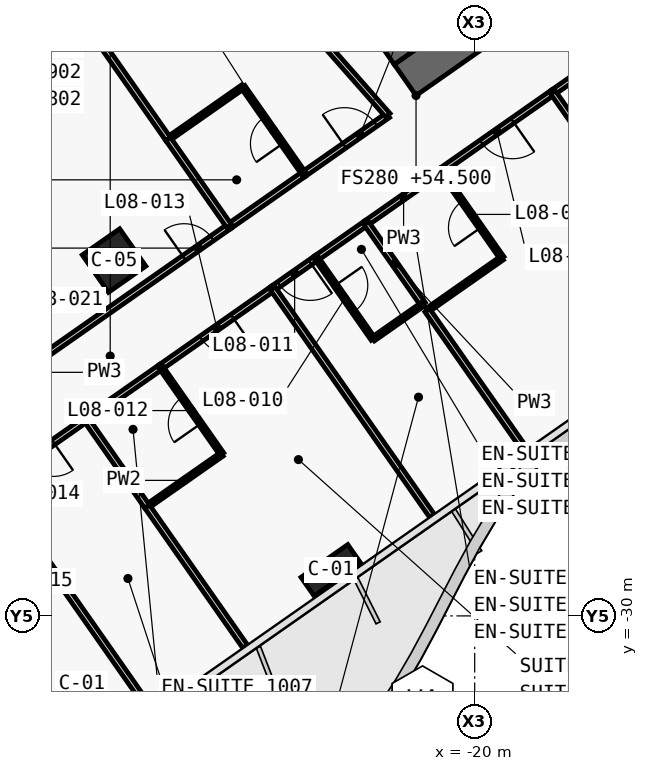
"""IFC4 building model, lengths in metres.
Left out: names, types, materials, properties, quantities, classifications, styles, units other than length and angle.
Written with IfcOpenShell. Run it as: python <this file> out.ifc"""

import sys

from ifc_helpers import new_model, si_unit, direction, frame, frame_2d, origin, origin_2d, place, context, subcontext, project, spatial, polyline, rectangle, outline, extrude, element, fill, save


model = new_model("IFC4")
c1 = context("Model", 3, precision=1e-05, world=origin(), true_north=direction((0.0, 1.0)))
c2 = subcontext(c1, "Body", "Model", "MODEL_VIEW")
j1 = project(units=[si_unit("LENGTHUNIT", "METRE"), si_unit("PLANEANGLEUNIT", "RADIAN")], contexts=[c1])
p1 = place(None, origin())
s1 = spatial("IfcSite", under=j1, at=p1, CompositionType="ELEMENT")
p2 = place(p1, origin())
s2 = spatial("IfcBuilding", under=s1, at=p2, CompositionType="ELEMENT")
p3 = place(p2, frame((0.0, 0.0, 54.5)))
s3 = spatial("IfcBuildingStorey", under=s2, at=p3, CompositionType="ELEMENT", Elevation=54.5)
p4 = place(p3, frame((0.037, -0.585, 0.0), z_axis=(0.0, 0.0, 1.0), x_axis=(-0.819157152511, -0.573569140985, 0.0)))
e1 = element("IfcWall", 1, at=p4, inside=s3, PredefinedType="SHEAR", context=c2, shape_type="SweptSolid", body=[
    extrude(outline(polyline([(26.695, 0.5), (0.7, 0.5), (0.0, -0.5), (26.695, -0.5), (26.695, 0.5)])), origin(), (0.0, 0.0, 1.0), 3.6),
])
p5 = place(p4, frame((2.995, 0.0, 0.0)))
e2 = element("IfcOpeningElement", 2, at=p5, cuts=e1, PredefinedType="OPENING", context=c2, shape_type="SweptSolid", body=[
    extrude(rectangle(XDim=2.4, YDim=2.1, at=frame_2d((1.2, 1.05))), frame((0.0, 0.51, 0.0), z_axis=(0.0, -1.0, 0.0), x_axis=(1.0, 0.0, 0.0)), (0.0, 0.0, 1.0), 1.02),
])
p6 = place(p4, frame((11.995, 0.0, 0.0)))
e3 = element("IfcOpeningElement", 3, at=p6, cuts=e1, PredefinedType="OPENING", context=c2, shape_type="SweptSolid", body=[
    extrude(rectangle(XDim=2.4, YDim=2.1, at=frame_2d((1.2, 1.05))), frame((0.0, 0.51, 0.0), z_axis=(0.0, -1.0, 0.0), x_axis=(1.0, 0.0, 0.0)), (0.0, 0.0, 1.0), 1.02),
])
p7 = place(p3, frame((-21.708, -15.2, 0.0), z_axis=(0.0, 0.0, 1.0), x_axis=(-0.573576324356, 0.819152122709, 0.0)))
e4 = element("IfcWall", 4, at=p7, inside=s3, PredefinedType="SHEAR", context=c2, shape_type="SweptSolid", body=[
    extrude(outline(polyline([(0.0, 0.5), (0.0, -0.5), (9.2, -0.5), (9.2, 0.5), (0.0, 0.5)])), origin(), (0.0, 0.0, 1.0), 3.6),
])
p8 = place(p7, frame((6.1, 0.0, 0.0)))
e5 = element("IfcOpeningElement", 5, at=p8, cuts=e4, PredefinedType="OPENING", context=c2, shape_type="SweptSolid", body=[
    extrude(rectangle(XDim=1.8, YDim=2.1, at=frame_2d((0.9, 1.05))), frame((0.0, 0.51, 0.0), z_axis=(0.0, -1.0, 0.0), x_axis=(1.0, 0.0, 0.0)), (0.0, 0.0, 1.0), 1.02),
])
p9 = place(p7, frame((1.9, 0.0, 0.0)))
e6 = element("IfcOpeningElement", 6, at=p9, cuts=e4, PredefinedType="OPENING", context=c2, shape_type="SweptSolid", body=[
    extrude(rectangle(XDim=1.8, YDim=2.1, at=frame_2d((0.9, 1.05))), frame((0.0, 0.51, 0.0), z_axis=(0.0, -1.0, 0.0), x_axis=(1.0, 0.0, 0.0)), (0.0, 0.0, 1.0), 1.02),
])
p10 = place(p3, frame((-23.782, -28.799, 0.0), z_axis=(0.0, 0.0, 1.0), x_axis=(-0.819152044289, -0.573576436351, 0.0)))
e7 = element("IfcColumn", 7, at=p10, inside=s3, PredefinedType="COLUMN", context=c2, shape_type="SweptSolid", body=[
    extrude(rectangle(XDim=1.5, YDim=0.6, at=origin_2d()), origin(), (0.0, 0.0, 1.0), 3.6),
])
p11 = place(p3, frame((-29.49, -20.649, 0.0), z_axis=(0.0, 0.0, 1.0), x_axis=(-0.819152044289, -0.573576436351, 0.0)))
e8 = element("IfcColumn", 8, at=p11, inside=s3, PredefinedType="COLUMN", context=c2, shape_type="SweptSolid", body=[
    extrude(rectangle(XDim=1.2, YDim=1.2, at=origin_2d()), origin(), (0.0, 0.0, 1.0), 3.6),
])
p12 = place(p3, frame((-24.493, -18.371, 0.0), z_axis=(0.0, 0.0, 1.0), x_axis=(0.819176640776, 0.573541307325, 0.0)))
e9 = element("IfcWall", 9, at=p12, inside=s3, PredefinedType="PARTITIONING", context=c2, shape_type="SweptSolid", body=[
    extrude(rectangle(XDim=2.698, YDim=0.15, at=frame_2d((1.349, 0.0))), origin(), (0.0, 0.0, 1.0), 3.32),
])
p13 = place(p12, frame((1.301, 0.0, 0.0)))
e10 = element("IfcOpeningElement", 10, at=p13, cuts=e9, PredefinedType="OPENING", context=c2, shape_type="SweptSolid", body=[
    extrude(rectangle(XDim=1.0, YDim=2.1, at=frame_2d((0.5, 1.05))), frame((0.0, 0.085, 0.0), z_axis=(0.0, -1.0, 0.0), x_axis=(1.0, 0.0, 0.0)), (0.0, 0.0, 1.0), 0.17),
])
p14 = place(p3, frame((-26.46, -19.748, 0.0), z_axis=(0.0, 0.0, 1.0), x_axis=(0.819179439794, 0.573537309527, 0.0)))
e11 = element("IfcWall", 11, at=p14, inside=s3, PredefinedType="PARTITIONING", context=c2, shape_type="SweptSolid", body=[
    extrude(rectangle(XDim=2.404, YDim=0.15, at=frame_2d((1.202, 0.0))), origin(), (0.0, 0.0, 1.0), 3.32),
])
p15 = place(p3, frame((-31.375, -23.19, 0.0), z_axis=(0.0, 0.0, 1.0), x_axis=(0.819165052243, 0.573557858619, 0.0)))
e12 = element("IfcWall", 12, at=p15, inside=s3, PredefinedType="PARTITIONING", context=c2, shape_type="SweptSolid", body=[
    extrude(rectangle(XDim=6.004, YDim=0.15, at=frame_2d((3.002, 0.0))), origin(), (0.0, 0.0, 1.0), 2.6),
])
p16 = place(p15, frame((4.552, 0.0, 0.0)))
e13 = element("IfcOpeningElement", 13, at=p16, cuts=e12, PredefinedType="OPENING", context=c2, shape_type="SweptSolid", body=[
    extrude(rectangle(XDim=0.9, YDim=2.1, at=frame_2d((0.45, 1.05))), frame((0.0, 0.085, 0.0), z_axis=(0.0, -1.0, 0.0), x_axis=(1.0, 0.0, 0.0)), (0.0, 0.0, 1.0), 0.17),
])
p17 = place(p3, frame((-15.48, -14.501, 0.0), z_axis=(0.0, 0.0, 1.0), x_axis=(-0.819193738533, -0.573516886193, 0.0)))
e14 = element("IfcWall", 14, at=p17, inside=s3, PredefinedType="PARTITIONING", context=c2, shape_type="SweptSolid", body=[
    extrude(rectangle(XDim=3.004, YDim=0.15, at=frame_2d((1.502, 0.0))), origin(), (0.0, 0.0, 1.0), 3.32),
])
p18 = place(p17, frame((1.052, 0.0, 0.0)))
e15 = element("IfcOpeningElement", 15, at=p18, cuts=e14, PredefinedType="OPENING", context=c2, shape_type="SweptSolid", body=[
    extrude(rectangle(XDim=0.9, YDim=2.1, at=frame_2d((0.45, 1.05))), frame((0.0, 0.085, 0.0), z_axis=(0.0, -1.0, 0.0), x_axis=(1.0, 0.0, 0.0)), (0.0, 0.0, 1.0), 0.17),
])
p19 = place(p3, frame((-17.937, -16.222, 0.0), z_axis=(0.0, 0.0, 1.0), x_axis=(-0.819145961204, -0.573585123798, 0.0)))
e16 = element("IfcWall", 16, at=p19, inside=s3, PredefinedType="PARTITIONING", context=c2, shape_type="SweptSolid", body=[
    extrude(rectangle(XDim=3.603, YDim=0.15, at=frame_2d((1.802, 0.0))), origin(), (0.0, 0.0, 1.0), 2.6),
])
p20 = place(p19, frame((1.302, 0.0, 0.0)))
e17 = element("IfcOpeningElement", 17, at=p20, cuts=e16, PredefinedType="OPENING", context=c2, shape_type="SweptSolid", body=[
    extrude(rectangle(XDim=1.0, YDim=2.1, at=frame_2d((0.5, 1.05))), frame((0.0, 0.085, 0.0), z_axis=(0.0, -1.0, 0.0), x_axis=(1.0, 0.0, 0.0)), (0.0, 0.0, 1.0), 0.17),
])
p21 = place(p3, frame((-20.886, -18.287, 0.0), z_axis=(0.0, 0.0, 1.0), x_axis=(-0.819146032251, -0.573585022335, 0.0)))
e18 = element("IfcWall", 18, at=p21, inside=s3, PredefinedType="PARTITIONING", context=c2, shape_type="SweptSolid", body=[
    extrude(rectangle(XDim=2.404, YDim=0.15, at=frame_2d((1.202, 0.0))), origin(), (0.0, 0.0, 1.0), 3.32),
])
p22 = place(p3, frame((-24.164, -20.582, 0.0), z_axis=(0.0, 0.0, 1.0), x_axis=(-0.819060210533, -0.573707566205, 0.0)))
e19 = element("IfcWall", 19, at=p22, inside=s3, PredefinedType="PARTITIONING", context=c2, shape_type="SweptSolid", body=[
    extrude(rectangle(XDim=1.403, YDim=0.15, at=frame_2d((0.702, 0.0))), origin(), (0.0, 0.0, 1.0), 3.32),
])
p23 = place(p22, frame((0.201, 0.0, 0.0)))
e20 = element("IfcOpeningElement", 20, at=p23, cuts=e19, PredefinedType="OPENING", context=c2, shape_type="SweptSolid", body=[
    extrude(rectangle(XDim=1.0, YDim=2.1, at=frame_2d((0.5, 1.05))), frame((0.0, 0.085, 0.0), z_axis=(0.0, -1.0, 0.0), x_axis=(1.0, 0.0, 0.0)), (0.0, 0.0, 1.0), 0.17),
])
p24 = place(p3, frame((-22.852, -19.664, 0.0), z_axis=(0.0, 0.0, 1.0), x_axis=(-0.819138938282, -0.573595153214, 0.0)))
e21 = element("IfcWall", 21, at=p24, inside=s3, PredefinedType="PARTITIONING", context=c2, shape_type="SweptSolid", body=[
    extrude(rectangle(XDim=1.604, YDim=0.15, at=frame_2d((0.802, 0.0))), origin(), (0.0, 0.0, 1.0), 3.32),
])
p25 = place(p3, frame((-25.31, -21.384, 0.0), z_axis=(0.0, 0.0, 1.0), x_axis=(-0.819145961204, -0.573585123798, 0.0)))
e22 = element("IfcWall", 22, at=p25, inside=s3, PredefinedType="PARTITIONING", context=c2, shape_type="SweptSolid", body=[
    extrude(rectangle(XDim=3.603, YDim=0.15, at=frame_2d((1.802, 0.0))), origin(), (0.0, 0.0, 1.0), 2.6),
])
p26 = place(p25, frame((1.302, 0.0, 0.0)))
e23 = element("IfcOpeningElement", 23, at=p26, cuts=e22, PredefinedType="OPENING", context=c2, shape_type="SweptSolid", body=[
    extrude(rectangle(XDim=1.0, YDim=2.1, at=frame_2d((0.5, 1.05))), frame((0.0, 0.085, 0.0), z_axis=(0.0, -1.0, 0.0), x_axis=(1.0, 0.0, 0.0)), (0.0, 0.0, 1.0), 0.17),
])
p27 = place(p3, frame((-28.259, -23.449, 0.0), z_axis=(0.0, 0.0, 1.0), x_axis=(-0.819146032251, -0.573585022335, 0.0)))
e24 = element("IfcWall", 24, at=p27, inside=s3, PredefinedType="PARTITIONING", context=c2, shape_type="SweptSolid", body=[
    extrude(rectangle(XDim=2.404, YDim=0.15, at=frame_2d((1.202, 0.0))), origin(), (0.0, 0.0, 1.0), 3.32),
])
p28 = place(p3, frame((-30.225, -24.826, 0.0), z_axis=(0.0, 0.0, 1.0), x_axis=(-0.819128818764, -0.573609604409, 0.0)))
e25 = element("IfcWall", 25, at=p28, inside=s3, PredefinedType="PARTITIONING", context=c2, shape_type="SweptSolid", body=[
    extrude(rectangle(XDim=3.004, YDim=0.15, at=frame_2d((1.502, 0.0))), origin(), (0.0, 0.0, 1.0), 3.32),
])
p29 = place(p28, frame((1.052, 0.0, 0.0)))
e26 = element("IfcOpeningElement", 26, at=p29, cuts=e25, PredefinedType="OPENING", context=c2, shape_type="SweptSolid", body=[
    extrude(rectangle(XDim=0.9, YDim=2.1, at=frame_2d((0.45, 1.05))), frame((0.0, 0.085, 0.0), z_axis=(0.0, -1.0, 0.0), x_axis=(1.0, 0.0, 0.0)), (0.0, 0.0, 1.0), 0.17),
])
p30 = place(p3, frame((-22.284, -16.827, 0.0), z_axis=(0.0, 0.0, 1.0), x_axis=(-0.661545117561, 0.749905365651, 0.0)))
e27 = element("IfcWall", 27, at=p30, inside=s3, PredefinedType="PARTITIONING", context=c2, shape_type="SweptSolid", body=[
    extrude(rectangle(XDim=6.543, YDim=0.15, at=frame_2d((3.271, 0.0))), origin(), (0.0, 0.0, 1.0), 2.6),
])
p31 = place(p3, frame((-24.492, -18.37, 0.0), z_axis=(0.0, 0.0, 1.0), x_axis=(-0.573550118428, 0.819170471667, 0.0)))
e28 = element("IfcWall", 28, at=p31, inside=s3, PredefinedType="PARTITIONING", context=c2, shape_type="SweptSolid", body=[
    extrude(rectangle(XDim=2.8, YDim=0.12, at=frame_2d((1.4, 0.0))), origin(), (0.0, 0.0, 1.0), 2.6),
])
p32 = place(p31, frame((0.975, 0.0, 0.0)))
e29 = element("IfcOpeningElement", 29, at=p32, cuts=e28, PredefinedType="OPENING", context=c2, shape_type="SweptSolid", body=[
    extrude(rectangle(XDim=0.85, YDim=2.05, at=frame_2d((0.425, 1.025))), frame((0.0, 0.07, 0.0), z_axis=(0.0, -1.0, 0.0), x_axis=(1.0, 0.0, 0.0)), (0.0, 0.0, 1.0), 0.14),
])
p33 = place(p3, frame((-26.099, -16.076, 0.0), z_axis=(0.0, 0.0, 1.0), x_axis=(-0.819155442668, -0.573571582932, 0.0)))
e30 = element("IfcWall", 30, at=p33, inside=s3, PredefinedType="PARTITIONING", context=c2, shape_type="SweptSolid", body=[
    extrude(rectangle(XDim=2.4, YDim=0.12, at=frame_2d((1.2, 0.0))), origin(), (0.0, 0.0, 1.0), 3.32),
])
p34 = place(p3, frame((-28.065, -17.453, 0.0), z_axis=(0.0, 0.0, 1.0), x_axis=(-0.573593433868, 0.819140142237, 0.0)))
e31 = element("IfcWall", 31, at=p34, inside=s3, PredefinedType="PARTITIONING", context=c2, shape_type="SweptSolid", body=[
    extrude(rectangle(XDim=8.499, YDim=0.15, at=frame_2d((4.25, 0.0))), origin(), (0.0, 0.0, 1.0), 2.6),
])
p35 = place(p3, frame((-26.458, -19.747, 0.0), z_axis=(0.0, 0.0, 1.0), x_axis=(-0.573550118428, 0.819170471667, 0.0)))
e32 = element("IfcWall", 32, at=p35, inside=s3, PredefinedType="PARTITIONING", context=c2, shape_type="SweptSolid", body=[
    extrude(rectangle(XDim=2.8, YDim=0.15, at=frame_2d((1.4, 0.0))), origin(), (0.0, 0.0, 1.0), 2.6),
])
p36 = place(p3, frame((-13.752, -22.203, 0.0), z_axis=(0.0, 0.0, 1.0), x_axis=(-0.573594765376, 0.819139209862, 0.0)))
e33 = element("IfcWall", 33, at=p36, inside=s3, PredefinedType="PARTITIONING", context=c2, shape_type="SweptSolid", body=[
    extrude(rectangle(XDim=7.3, YDim=0.15, at=frame_2d((3.65, 0.0))), origin(), (0.0, 0.0, 1.0), 2.5),
])
p37 = place(p3, frame((-21.247, -21.959, 0.0), z_axis=(0.0, 0.0, 1.0), x_axis=(0.819141114317, 0.573592045652, 0.0)))
e34 = element("IfcWall", 34, at=p37, inside=s3, PredefinedType="PARTITIONING", context=c2, shape_type="SweptSolid", body=[
    extrude(rectangle(XDim=2.4, YDim=0.12, at=frame_2d((1.2, 0.0))), origin(), (0.0, 0.0, 1.0), 3.32),
])
p38 = place(p3, frame((-19.281, -20.581, 0.0), z_axis=(0.0, 0.0, 1.0), x_axis=(-0.573550118428, 0.819170471667, 0.0)))
e35 = element("IfcWall", 35, at=p38, inside=s3, PredefinedType="PARTITIONING", context=c2, shape_type="SweptSolid", body=[
    extrude(rectangle(XDim=2.8, YDim=0.12, at=frame_2d((1.4, 0.0))), origin(), (0.0, 0.0, 1.0), 3.32),
])
p39 = place(p38, frame((0.975, 0.0, 0.0)))
e36 = element("IfcOpeningElement", 36, at=p39, cuts=e35, PredefinedType="OPENING", context=c2, shape_type="SweptSolid", body=[
    extrude(rectangle(XDim=0.85, YDim=2.05, at=frame_2d((0.425, 1.025))), frame((0.0, 0.07, 0.0), z_axis=(0.0, -1.0, 0.0), x_axis=(1.0, 0.0, 0.0)), (0.0, 0.0, 1.0), 0.14),
])
p40 = place(p3, frame((-18.667, -25.645, 0.0), z_axis=(0.0, 0.0, 1.0), x_axis=(-0.573589807488, 0.819142681555, 0.0)))
e37 = element("IfcWall", 37, at=p40, inside=s3, PredefinedType="PARTITIONING", context=c2, shape_type="SweptSolid", body=[
    extrude(rectangle(XDim=4.499, YDim=0.15, at=frame_2d((2.25, 0.0))), origin(), (0.0, 0.0, 1.0), 2.5),
])
p41 = place(p3, frame((-21.361, -21.796, 0.0), z_axis=(0.0, 0.0, 1.0), x_axis=(-0.573588285102, 0.819143747577, 0.0)))
e38 = element("IfcWall", 38, at=p41, inside=s3, PredefinedType="PARTITIONING", context=c2, shape_type="SweptSolid", body=[
    extrude(rectangle(XDim=2.602, YDim=0.15, at=frame_2d((1.301, 0.0))), origin(), (0.0, 0.0, 1.0), 3.32),
])
p42 = place(p3, frame((-24.165, -20.583, 0.0), z_axis=(0.0, 0.0, 1.0), x_axis=(0.573537965655, -0.819178980414, 0.0)))
e39 = element("IfcWall", 39, at=p42, inside=s3, PredefinedType="PARTITIONING", context=c2, shape_type="SweptSolid", body=[
    extrude(rectangle(XDim=2.6, YDim=0.12, at=frame_2d((1.3, 0.0))), origin(), (0.0, 0.0, 1.0), 3.32),
])
p43 = place(p42, frame((0.875, 0.0, 0.0)))
e40 = element("IfcOpeningElement", 40, at=p43, cuts=e39, PredefinedType="OPENING", context=c2, shape_type="SweptSolid", body=[
    extrude(rectangle(XDim=0.85, YDim=2.05, at=frame_2d((0.425, 1.025))), frame((0.0, 0.07, 0.0), z_axis=(0.0, -1.0, 0.0), x_axis=(1.0, 0.0, 0.0)), (0.0, 0.0, 1.0), 0.14),
])
p44 = place(p3, frame((-22.673, -22.713, 0.0), z_axis=(0.0, 0.0, 1.0), x_axis=(0.819131543282, 0.57360571371, 0.0)))
e41 = element("IfcWall", 41, at=p44, inside=s3, PredefinedType="PARTITIONING", context=c2, shape_type="SweptSolid", body=[
    extrude(rectangle(XDim=1.6, YDim=0.12, at=frame_2d((0.8, 0.0))), origin(), (0.0, 0.0, 1.0), 3.32),
])
p45 = place(p3, frame((-21.124, -27.365, 0.0), z_axis=(0.0, 0.0, 1.0), x_axis=(-0.573572324301, 0.819154923562, 0.0)))
e42 = element("IfcWall", 42, at=p45, inside=s3, PredefinedType="PARTITIONING", context=c2, shape_type="SweptSolid", body=[
    extrude(rectangle(XDim=7.3, YDim=0.15, at=frame_2d((3.65, 0.0))), origin(), (0.0, 0.0, 1.0), 2.5),
])
p46 = place(p3, frame((-28.62, -27.121, 0.0), z_axis=(0.0, 0.0, 1.0), x_axis=(0.819188907105, 0.573523787192, 0.0)))
e43 = element("IfcWall", 43, at=p46, inside=s3, PredefinedType="PARTITIONING", context=c2, shape_type="SweptSolid", body=[
    extrude(rectangle(XDim=2.4, YDim=0.12, at=frame_2d((1.2, 0.0))), origin(), (0.0, 0.0, 1.0), 3.32),
])
p47 = place(p3, frame((-26.653, -25.743, 0.0), z_axis=(0.0, 0.0, 1.0), x_axis=(-0.573608623498, 0.819129505664, 0.0)))
e44 = element("IfcWall", 44, at=p47, inside=s3, PredefinedType="PARTITIONING", context=c2, shape_type="SweptSolid", body=[
    extrude(rectangle(XDim=2.8, YDim=0.12, at=frame_2d((1.4, 0.0))), origin(), (0.0, 0.0, 1.0), 3.32),
])
p48 = place(p47, frame((0.975, 0.0, 0.0)))
e45 = element("IfcOpeningElement", 45, at=p48, cuts=e44, PredefinedType="OPENING", context=c2, shape_type="SweptSolid", body=[
    extrude(rectangle(XDim=0.85, YDim=2.05, at=frame_2d((0.425, 1.025))), frame((0.0, 0.07, 0.0), z_axis=(0.0, -1.0, 0.0), x_axis=(1.0, 0.0, 0.0)), (0.0, 0.0, 1.0), 0.14),
])
p49 = place(p3, frame((-26.039, -30.807, 0.0), z_axis=(0.0, 0.0, 1.0), x_axis=(-0.573589807488, 0.819142681555, 0.0)))
e46 = element("IfcWall", 46, at=p49, inside=s3, PredefinedType="PARTITIONING", context=c2, shape_type="SweptSolid", body=[
    extrude(rectangle(XDim=4.499, YDim=0.15, at=frame_2d((2.25, 0.0))), origin(), (0.0, 0.0, 1.0), 2.5),
])
p50 = place(p3, frame((-28.62, -27.121, 0.0), z_axis=(0.0, 0.0, 1.0), x_axis=(-0.573608623498, 0.819129505664, 0.0)))
e47 = element("IfcWall", 47, at=p50, inside=s3, PredefinedType="PARTITIONING", context=c2, shape_type="SweptSolid", body=[
    extrude(rectangle(XDim=2.8, YDim=0.15, at=frame_2d((1.4, 0.0))), origin(), (0.0, 0.0, 1.0), 3.32),
])
p51 = place(p3, frame((-28.497, -32.528, 0.0), z_axis=(0.0, 0.0, 1.0), x_axis=(-0.573556991349, 0.819165659482, 0.0)))
e48 = element("IfcWall", 48, at=p51, inside=s3, PredefinedType="PARTITIONING", context=c2, shape_type="SweptSolid", body=[
    extrude(rectangle(XDim=4.501, YDim=0.15, at=frame_2d((2.25, 0.0))), origin(), (0.0, 0.0, 1.0), 2.5),
])
p52 = place(p3, frame((-31.076, -28.843, 0.0), z_axis=(0.0, 0.0, 1.0), x_axis=(-0.573555899632, 0.819166423871, 0.0)))
e49 = element("IfcWall", 49, at=p52, inside=s3, PredefinedType="PARTITIONING", context=c2, shape_type="SweptSolid", body=[
    extrude(rectangle(XDim=2.802, YDim=0.15, at=frame_2d((1.401, 0.0))), origin(), (0.0, 0.0, 1.0), 3.32),
])
p53 = place(p3, frame((-33.043, -30.219, 0.0), z_axis=(0.0, 0.0, 1.0), x_axis=(0.819107643868, 0.573639841501, 0.0)))
e50 = element("IfcWall", 50, at=p53, inside=s3, PredefinedType="PARTITIONING", context=c2, shape_type="SweptSolid", body=[
    extrude(rectangle(XDim=2.4, YDim=0.12, at=frame_2d((1.2, 0.0))), origin(), (0.0, 0.0, 1.0), 3.32),
])
p54 = place(p39, origin())
e51 = element("IfcDoor", 51, at=p54, inside=s3, OperationType="SINGLE_SWING_RIGHT", PredefinedType="DOOR", context=c2, shape_type="SweptSolid", body=[
    extrude(rectangle(XDim=0.85, YDim=2.05, at=frame_2d((0.425, 1.025))), frame((0.0, 0.025, 0.0), z_axis=(0.0, -1.0, 0.0), x_axis=(1.0, 0.0, 0.0)), (0.0, 0.0, 1.0), 0.05),
])
fill(e36, e51)
p55 = place(p20, origin())
e52 = element("IfcDoor", 52, at=p55, inside=s3, OperationType="SINGLE_SWING_LEFT", PredefinedType="DOOR", context=c2, shape_type="SweptSolid", body=[
    extrude(rectangle(XDim=1.0, YDim=2.1, at=frame_2d((0.5, 1.05))), frame((0.0, 0.025, 0.0), z_axis=(0.0, -1.0, 0.0), x_axis=(1.0, 0.0, 0.0)), (0.0, 0.0, 1.0), 0.05),
])
fill(e17, e52)
p56 = place(p43, origin())
e53 = element("IfcDoor", 53, at=p56, inside=s3, OperationType="SINGLE_SWING_LEFT", PredefinedType="DOOR", context=c2, shape_type="SweptSolid", body=[
    extrude(rectangle(XDim=0.85, YDim=2.05, at=frame_2d((0.425, 1.025))), frame((0.0, 0.025, 0.0), z_axis=(0.0, -1.0, 0.0), x_axis=(1.0, 0.0, 0.0)), (0.0, 0.0, 1.0), 0.05),
])
fill(e40, e53)
p57 = place(p23, origin())
e54 = element("IfcDoor", 54, at=p57, inside=s3, OperationType="SINGLE_SWING_RIGHT", PredefinedType="DOOR", context=c2, shape_type="SweptSolid", body=[
    extrude(rectangle(XDim=1.0, YDim=2.1, at=frame_2d((0.5, 1.05))), frame((0.0, 0.025, 0.0), z_axis=(0.0, -1.0, 0.0), x_axis=(1.0, 0.0, 0.0)), (0.0, 0.0, 1.0), 0.05),
])
fill(e20, e54)
p58 = place(p48, origin())
e55 = element("IfcDoor", 55, at=p58, inside=s3, OperationType="SINGLE_SWING_RIGHT", PredefinedType="DOOR", context=c2, shape_type="SweptSolid", body=[
    extrude(rectangle(XDim=0.85, YDim=2.05, at=frame_2d((0.425, 1.025))), frame((0.0, 0.025, 0.0), z_axis=(0.0, -1.0, 0.0), x_axis=(1.0, 0.0, 0.0)), (0.0, 0.0, 1.0), 0.05),
])
fill(e45, e55)
p59 = place(p26, origin())
e56 = element("IfcDoor", 56, at=p59, inside=s3, OperationType="SINGLE_SWING_LEFT", PredefinedType="DOOR", context=c2, shape_type="SweptSolid", body=[
    extrude(rectangle(XDim=1.0, YDim=2.1, at=frame_2d((0.5, 1.05))), frame((0.0, 0.025, 0.0), z_axis=(0.0, -1.0, 0.0), x_axis=(1.0, 0.0, 0.0)), (0.0, 0.0, 1.0), 0.05),
])
fill(e23, e56)
p60 = place(p29, origin())
e57 = element("IfcDoor", 57, at=p60, inside=s3, OperationType="SINGLE_SWING_LEFT", PredefinedType="DOOR", context=c2, shape_type="SweptSolid", body=[
    extrude(rectangle(XDim=0.9, YDim=2.1, at=frame_2d((0.45, 1.05))), frame((0.0, 0.025, 0.0), z_axis=(0.0, -1.0, 0.0), x_axis=(1.0, 0.0, 0.0)), (0.0, 0.0, 1.0), 0.05),
])
fill(e26, e57)
p61 = place(p32, origin())
e58 = element("IfcDoor", 58, at=p61, inside=s3, OperationType="SINGLE_SWING_LEFT", PredefinedType="DOOR", context=c2, shape_type="SweptSolid", body=[
    extrude(rectangle(XDim=0.85, YDim=2.05, at=frame_2d((0.425, 1.025))), frame((0.0, 0.025, 0.0), z_axis=(0.0, -1.0, 0.0), x_axis=(1.0, 0.0, 0.0)), (0.0, 0.0, 1.0), 0.05),
])
fill(e29, e58)
p62 = place(p13, origin())
e59 = element("IfcDoor", 59, at=p62, inside=s3, OperationType="SINGLE_SWING_RIGHT", PredefinedType="DOOR", context=c2, shape_type="SweptSolid", body=[
    extrude(rectangle(XDim=1.0, YDim=2.1, at=frame_2d((0.5, 1.05))), frame((0.0, 0.025, 0.0), z_axis=(0.0, -1.0, 0.0), x_axis=(1.0, 0.0, 0.0)), (0.0, 0.0, 1.0), 0.05),
])
fill(e10, e59)
p63 = place(p16, origin())
e60 = element("IfcDoor", 60, at=p63, inside=s3, OperationType="SINGLE_SWING_LEFT", PredefinedType="DOOR", context=c2, shape_type="SweptSolid", body=[
    extrude(rectangle(XDim=0.9, YDim=2.1, at=frame_2d((0.45, 1.05))), frame((0.0, 0.025, 0.0), z_axis=(0.0, -1.0, 0.0), x_axis=(1.0, 0.0, 0.0)), (0.0, 0.0, 1.0), 0.05),
])
fill(e13, e60)
save(model, sys.argv[1])
